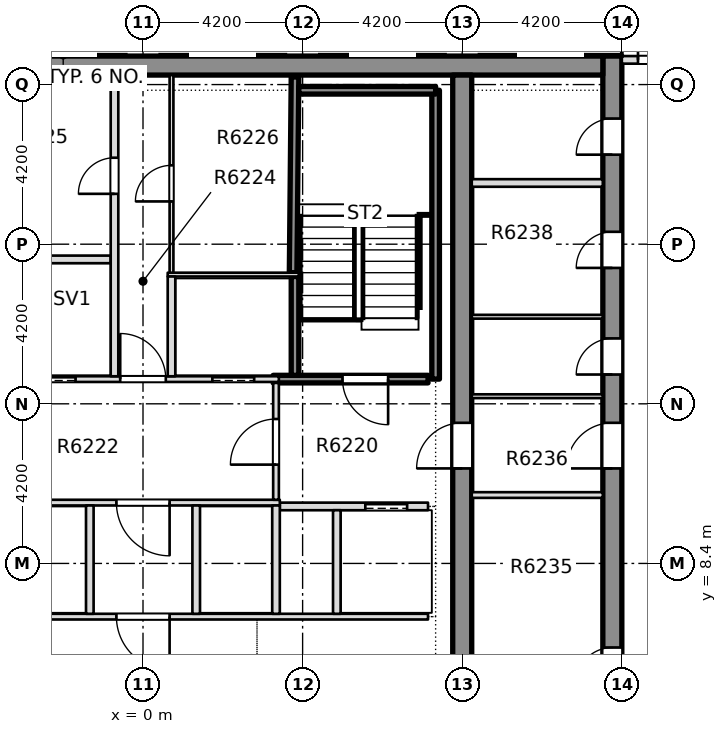
"""IFC4 building model, lengths in metres.
Left out: names, types, materials, properties, quantities, classifications, styles, units other than length and angle.
Written with IfcOpenShell. Run it as: python <this file> out.ifc"""

import sys

from ifc_helpers import new_model, si_unit, direction, frame, frame_2d, origin, place, context, subcontext, project, spatial, rectangle, extrude, element, fill, save


model = new_model("IFC4")
c1 = context("Model", 3, precision=1e-05, world=origin(), true_north=direction((0.0, 1.0)))
c2 = subcontext(c1, "Body", "Model", "MODEL_VIEW")
j1 = project(units=[si_unit("LENGTHUNIT", "METRE"), si_unit("PLANEANGLEUNIT", "RADIAN")], contexts=[c1])
p1 = place(None, origin())
s1 = spatial("IfcSite", under=j1, at=p1, CompositionType="ELEMENT")
p2 = place(p1, origin())
s2 = spatial("IfcBuilding", under=s1, at=p2, CompositionType="ELEMENT")
p3 = place(p2, frame((0.0, 0.0, 237.25)))
s3 = spatial("IfcBuildingStorey", under=s2, at=p3, CompositionType="ELEMENT", Elevation=237.25)
p4 = place(p3, frame((12.35, -8.4, -0.4), z_axis=(0.0, 0.0, 1.0), x_axis=(0.0, 1.0, 0.0)))
e1 = element("IfcWall", 1, at=p4, inside=s3, PredefinedType="SHEAR", context=c2, shape_type="SweptSolid", body=[
    extrude(rectangle(XDim=30.15, YDim=0.5, at=frame_2d((15.075, 0.0))), origin(), (0.0, 0.0, 1.0), 3.45),
])
p5 = place(p4, frame((4.788, 0.0, 0.4)))
e2 = element("IfcOpeningElement", 2, at=p5, cuts=e1, PredefinedType="OPENING", context=c2, shape_type="SweptSolid", body=[
    extrude(rectangle(XDim=0.95, YDim=2.1, at=frame_2d((0.475, 1.05))), frame((0.0, 0.26, 0.0), z_axis=(0.0, -1.0, 0.0), x_axis=(1.0, 0.0, 0.0)), (0.0, 0.0, 1.0), 0.52),
])
p6 = place(p4, frame((13.638, 0.0, 0.4)))
e3 = element("IfcOpeningElement", 3, at=p6, cuts=e1, PredefinedType="OPENING", context=c2, shape_type="SweptSolid", body=[
    extrude(rectangle(XDim=0.95, YDim=2.1, at=frame_2d((0.475, 1.05))), frame((0.0, 0.26, 0.0), z_axis=(0.0, -1.0, 0.0), x_axis=(1.0, 0.0, 0.0)), (0.0, 0.0, 1.0), 0.52),
])
p7 = place(p4, frame((21.771, 0.0, 0.4)))
e4 = element("IfcOpeningElement", 4, at=p7, cuts=e1, PredefinedType="OPENING", context=c2, shape_type="SweptSolid", body=[
    extrude(rectangle(XDim=0.95, YDim=2.1, at=frame_2d((0.475, 1.05))), frame((0.0, 0.26, 0.0), z_axis=(0.0, -1.0, 0.0), x_axis=(1.0, 0.0, 0.0)), (0.0, 0.0, 1.0), 0.52),
])
p8 = place(p4, frame((24.576, 0.0, 0.4)))
e5 = element("IfcOpeningElement", 5, at=p8, cuts=e1, PredefinedType="OPENING", context=c2, shape_type="SweptSolid", body=[
    extrude(rectangle(XDim=0.95, YDim=2.1, at=frame_2d((0.475, 1.05))), frame((0.0, 0.26, 0.0), z_axis=(0.0, -1.0, 0.0), x_axis=(1.0, 0.0, 0.0)), (0.0, 0.0, 1.0), 0.52),
])
p9 = place(p4, frame((27.555, 0.0, 0.4)))
e6 = element("IfcOpeningElement", 6, at=p9, cuts=e1, PredefinedType="OPENING", context=c2, shape_type="SweptSolid", body=[
    extrude(rectangle(XDim=0.95, YDim=2.1, at=frame_2d((0.475, 1.05))), frame((0.0, 0.26, 0.0), z_axis=(0.0, -1.0, 0.0), x_axis=(1.0, 0.0, 0.0)), (0.0, 0.0, 1.0), 0.52),
])
p10 = place(p4, frame((19.3, 0.0, 0.4)))
e7 = element("IfcOpeningElement", 7, at=p10, cuts=e1, PredefinedType="OPENING", context=c2, shape_type="SweptSolid", body=[
    extrude(rectangle(XDim=1.2, YDim=2.1, at=frame_2d((0.6, 1.05))), frame((0.0, 0.26, 0.0), z_axis=(0.0, -1.0, 0.0), x_axis=(1.0, 0.0, 0.0)), (0.0, 0.0, 1.0), 0.52),
])
p11 = place(p3, frame((-12.1, 21.5, -0.4), z_axis=(0.0, 0.0, 1.0), x_axis=(1.0, 0.0, 0.0)))
e8 = element("IfcWall", 8, at=p11, inside=s3, PredefinedType="SHEAR", context=c2, shape_type="SweptSolid", body=[
    extrude(rectangle(XDim=24.2, YDim=0.5, at=frame_2d((12.1, 0.0))), origin(), (0.0, 0.0, 1.0), 3.45),
])
p12 = place(p3, frame((8.4, -7.9, -0.4), z_axis=(0.0, 0.0, 1.0), x_axis=(0.0, 1.0, 0.0)))
e9 = element("IfcWall", 9, at=p12, inside=s3, PredefinedType="SHEAR", context=c2, shape_type="SweptSolid", body=[
    extrude(rectangle(XDim=29.15, YDim=0.5, at=frame_2d((14.575, 0.0))), origin(), (0.0, 0.0, 1.0), 3.45),
])
p13 = place(p12, frame((18.8, 0.0, 0.4)))
e10 = element("IfcOpeningElement", 10, at=p13, cuts=e9, PredefinedType="OPENING", context=c2, shape_type="SweptSolid", body=[
    extrude(rectangle(XDim=1.2, YDim=2.1, at=frame_2d((0.6, 1.05))), frame((0.0, 0.26, 0.0), z_axis=(0.0, -1.0, 0.0), x_axis=(1.0, 0.0, 0.0)), (0.0, 0.0, 1.0), 0.52),
])
p14 = place(p3, frame((16.35, 21.65, 0.0), z_axis=(0.0, 0.0, 1.0), x_axis=(-1.0, 0.0, 0.0)))
e11 = element("IfcWall", 11, at=p14, inside=s3, PredefinedType="STANDARD", context=c2, shape_type="SweptSolid", body=[
    extrude(rectangle(XDim=3.75, YDim=0.2, at=frame_2d((1.875, 0.0))), origin(), (0.0, 0.0, 1.0), 3.05),
])
p15 = place(p14, frame((2.325, 0.0, 0.0)))
e12 = element("IfcOpeningElement", 12, at=p15, cuts=e11, PredefinedType="OPENING", context=c2, shape_type="SweptSolid", body=[
    extrude(rectangle(XDim=1.0, YDim=2.4, at=frame_2d((0.5, 1.2))), frame((0.0, 0.11, 0.0), z_axis=(0.0, -1.0, 0.0), x_axis=(1.0, 0.0, 0.0)), (0.0, 0.0, 1.0), 0.22),
])
p16 = place(p3, frame((-7.5, 7.0, 0.0), z_axis=(0.0, 0.0, 1.0), x_axis=(1.0, 0.0, 0.0)))
e13 = element("IfcWall", 13, at=p16, inside=s3, PredefinedType="PARTITIONING", context=c2, shape_type="SweptSolid", body=[
    extrude(rectangle(XDim=15.0, YDim=0.15, at=frame_2d((7.5, 0.0))), origin(), (0.0, 0.0, 1.0), 3.05),
])
p17 = place(p16, frame((6.8, 0.0, 0.0)))
e14 = element("IfcOpeningElement", 14, at=p17, cuts=e13, PredefinedType="OPENING", context=c2, shape_type="SweptSolid", body=[
    extrude(rectangle(XDim=1.4, YDim=2.1, at=frame_2d((0.7, 1.05))), frame((0.0, 0.085, 0.0), z_axis=(0.0, -1.0, 0.0), x_axis=(1.0, 0.0, 0.0)), (0.0, 0.0, 1.0), 0.17),
])
p18 = place(p3, frame((3.6, 9.9, 0.0), z_axis=(0.0, 0.0, 1.0), x_axis=(1.0, 0.0, 0.0)))
e15 = element("IfcWall", 15, at=p18, inside=s3, PredefinedType="PARTITIONING", context=c2, shape_type="SweptSolid", body=[
    extrude(rectangle(XDim=3.9, YDim=0.2, at=frame_2d((1.95, 0.0))), origin(), (0.0, 0.0, 1.0), 3.05),
])
p19 = place(p18, frame((2.25, 0.0, 0.0)))
e16 = element("IfcOpeningElement", 16, at=p19, cuts=e15, PredefinedType="OPENING", context=c2, shape_type="SweptSolid", body=[
    extrude(rectangle(XDim=1.1, YDim=2.1, at=frame_2d((0.55, 1.05))), frame((0.0, 0.11, 0.0), z_axis=(0.0, -1.0, 0.0), x_axis=(1.0, 0.0, 0.0)), (0.0, 0.0, 1.0), 0.22),
])
p20 = place(p3, frame((-3.6, 10.0, 0.0), z_axis=(0.0, 0.0, 1.0), x_axis=(1.0, 0.0, 0.0)))
e17 = element("IfcWall", 17, at=p20, inside=s3, PredefinedType="PARTITIONING", context=c2, shape_type="SweptSolid", body=[
    extrude(rectangle(XDim=7.2, YDim=0.15, at=frame_2d((3.6, 0.0))), origin(), (0.0, 0.0, 1.0), 3.05),
])
p21 = place(p20, frame((2.9, 0.0, 0.0)))
e18 = element("IfcOpeningElement", 18, at=p21, cuts=e17, PredefinedType="OPENING", context=c2, shape_type="SweptSolid", body=[
    extrude(rectangle(XDim=1.4, YDim=2.1, at=frame_2d((0.7, 1.05))), frame((0.0, 0.085, 0.0), z_axis=(0.0, -1.0, 0.0), x_axis=(1.0, 0.0, 0.0)), (0.0, 0.0, 1.0), 0.17),
])
p22 = place(p3, frame((-3.575, 13.25, 0.0), z_axis=(0.0, 0.0, 1.0), x_axis=(1.0, 0.0, 0.0)))
e19 = element("IfcWall", 19, at=p22, inside=s3, PredefinedType="PARTITIONING", context=c2, shape_type="SweptSolid", body=[
    extrude(rectangle(XDim=7.15, YDim=0.15, at=frame_2d((3.575, 0.0))), origin(), (0.0, 0.0, 1.0), 3.05),
])
p23 = place(p22, frame((0.6, 0.0, 0.0)))
e20 = element("IfcOpeningElement", 20, at=p23, cuts=e19, PredefinedType="OPENING", context=c2, shape_type="SweptSolid", body=[
    extrude(rectangle(XDim=1.2, YDim=2.1, at=frame_2d((0.6, 1.05))), frame((0.0, 0.085, 0.0), z_axis=(0.0, -1.0, 0.0), x_axis=(1.0, 0.0, 0.0)), (0.0, 0.0, 1.0), 0.17),
])
p24 = place(p22, frame((5.4, 0.0, 0.0)))
e21 = element("IfcOpeningElement", 21, at=p24, cuts=e19, PredefinedType="OPENING", context=c2, shape_type="SweptSolid", body=[
    extrude(rectangle(XDim=1.1, YDim=2.1, at=frame_2d((0.55, 1.05))), frame((0.0, 0.085, 0.0), z_axis=(0.0, -1.0, 0.0), x_axis=(1.0, 0.0, 0.0)), (0.0, 0.0, 1.0), 0.17),
])
p25 = place(p22, frame((2.975, 0.0, 0.0)))
e22 = element("IfcOpeningElement", 22, at=p25, cuts=e19, PredefinedType="OPENING", context=c2, shape_type="SweptSolid", body=[
    extrude(rectangle(XDim=1.2, YDim=2.1, at=frame_2d((0.6, 1.05))), frame((0.0, 0.085, 0.0), z_axis=(0.0, -1.0, 0.0), x_axis=(1.0, 0.0, 0.0)), (0.0, 0.0, 1.0), 0.17),
])
p26 = place(p3, frame((3.425, 13.25, 0.0), z_axis=(0.0, 0.0, 1.0), x_axis=(1.0, 0.0, 0.0)))
e23 = element("IfcWall", 23, at=p26, inside=s3, PredefinedType="SOLIDWALL", context=c2, shape_type="SweptSolid", body=[
    extrude(rectangle(XDim=4.075, YDim=0.2, at=frame_2d((2.038, 0.0))), origin(), (0.0, 0.0, 1.0), 3.05),
])
p27 = place(p26, frame((1.825, 0.0, 0.0)))
e24 = element("IfcOpeningElement", 24, at=p27, cuts=e23, PredefinedType="OPENING", context=c2, shape_type="SweptSolid", body=[
    extrude(rectangle(XDim=1.2, YDim=2.1, at=frame_2d((0.6, 1.05))), frame((0.0, 0.11, 0.0), z_axis=(0.0, -1.0, 0.0), x_axis=(1.0, 0.0, 0.0)), (0.0, 0.0, 1.0), 0.22),
])
p28 = place(p3, frame((0.65, 16.0, 0.0), z_axis=(0.0, 0.0, 1.0), x_axis=(1.0, 0.0, 0.0)))
e25 = element("IfcWall", 25, at=p28, inside=s3, PredefinedType="PARTITIONING", context=c2, shape_type="SweptSolid", body=[
    extrude(rectangle(XDim=3.45, YDim=0.1, at=frame_2d((1.725, 0.0))), origin(), (0.0, 0.0, 1.0), 3.05),
])
p29 = place(p3, frame((-3.9, 16.4, 0.0), z_axis=(0.0, 0.0, 1.0), x_axis=(1.0, 0.0, 0.0)))
e26 = element("IfcWall", 26, at=p29, inside=s3, PredefinedType="PARTITIONING", context=c2, shape_type="SweptSolid", body=[
    extrude(rectangle(XDim=3.05, YDim=0.2, at=frame_2d((1.525, 0.0))), origin(), (0.0, 0.0, 1.0), 3.05),
])
p30 = place(p3, frame((-1.4, 7.075, 0.0), z_axis=(0.0, 0.0, 1.0), x_axis=(0.0, 1.0, 0.0)))
e27 = element("IfcWall", 27, at=p30, inside=s3, PredefinedType="PARTITIONING", context=c2, shape_type="SweptSolid", body=[
    extrude(rectangle(XDim=2.85, YDim=0.2, at=frame_2d((1.425, 0.0))), origin(), (0.0, 0.0, 1.0), 3.05),
])
p31 = place(p3, frame((-0.75, 13.325, 0.0), z_axis=(0.0, 0.0, 1.0), x_axis=(0.0, 1.0, 0.0)))
e28 = element("IfcWall", 28, at=p31, inside=s3, PredefinedType="PARTITIONING", context=c2, shape_type="SweptSolid", body=[
    extrude(rectangle(XDim=7.924, YDim=0.2, at=frame_2d((3.962, 0.0))), origin(), (0.0, 0.0, 1.0), 3.05),
])
p32 = place(p31, frame((4.8, 0.0, 0.0)))
e29 = element("IfcOpeningElement", 29, at=p32, cuts=e28, PredefinedType="OPENING", context=c2, shape_type="SweptSolid", body=[
    extrude(rectangle(XDim=0.95, YDim=2.1, at=frame_2d((0.475, 1.05))), frame((0.0, 0.11, 0.0), z_axis=(0.0, -1.0, 0.0), x_axis=(1.0, 0.0, 0.0)), (0.0, 0.0, 1.0), 0.22),
])
p33 = place(p3, frame((0.75, 13.325, 0.0), z_axis=(0.0, 0.0, 1.0), x_axis=(0.0, 1.0, 0.0)))
e30 = element("IfcWall", 30, at=p33, inside=s3, PredefinedType="PARTITIONING", context=c2, shape_type="SweptSolid", body=[
    extrude(rectangle(XDim=2.625, YDim=0.2, at=frame_2d((1.312, 0.0))), origin(), (0.0, 0.0, 1.0), 3.05),
])
p34 = place(p3, frame((0.75, 16.05, 0.0), z_axis=(0.0, 0.0, 1.0), x_axis=(0.0, 1.0, 0.0)))
e31 = element("IfcWall", 31, at=p34, inside=s3, PredefinedType="PARTITIONING", context=c2, shape_type="SweptSolid", body=[
    extrude(rectangle(XDim=5.199, YDim=0.1, at=frame_2d((2.6, 0.0))), origin(), (0.0, 0.0, 1.0), 3.05),
])
p35 = place(p34, frame((1.875, 0.0, 0.0)))
e32 = element("IfcOpeningElement", 32, at=p35, cuts=e31, PredefinedType="OPENING", context=c2, shape_type="SweptSolid", body=[
    extrude(rectangle(XDim=0.95, YDim=2.1, at=frame_2d((0.475, 1.05))), frame((0.0, 0.06, 0.0), z_axis=(0.0, -1.0, 0.0), x_axis=(1.0, 0.0, 0.0)), (0.0, 0.0, 1.0), 0.12),
])
for number, where, z_axis, x_axis in (
    (33, (1.4, 7.075, 0.0), (0.0, 0.0, 1.0), (0.0, 1.0, 0.0)),
    (34, (3.5, 7.075, 0.0), (0.0, 0.0, 1.0), (0.0, 1.0, 0.0)),
):
    element("IfcWall", number, at=place(p3, frame(where, z_axis=z_axis, x_axis=x_axis)), inside=s3, PredefinedType="PARTITIONING", context=c2, shape_type="SweptSolid", body=[
        extrude(rectangle(XDim=2.85, YDim=0.2, at=frame_2d((1.425, 0.0))), origin(), (0.0, 0.0, 1.0), 3.05),
    ])
p36 = place(p3, frame((3.5, 10.075, 0.0), z_axis=(0.0, 0.0, 1.0), x_axis=(0.0, 1.0, 0.0)))
e35 = element("IfcWall", 35, at=p36, inside=s3, PredefinedType="PARTITIONING", context=c2, shape_type="SweptSolid", body=[
    extrude(rectangle(XDim=3.075, YDim=0.15, at=frame_2d((1.538, 0.0))), origin(), (0.0, 0.0, 1.0), 3.05),
])
p37 = place(p36, frame((0.925, 0.0, 0.0)))
e36 = element("IfcOpeningElement", 36, at=p37, cuts=e35, PredefinedType="OPENING", context=c2, shape_type="SweptSolid", body=[
    extrude(rectangle(XDim=1.2, YDim=2.1, at=frame_2d((0.6, 1.05))), frame((0.0, 0.085, 0.0), z_axis=(0.0, -1.0, 0.0), x_axis=(1.0, 0.0, 0.0)), (0.0, 0.0, 1.0), 0.17),
])
p38 = place(p3, frame((4.0, 13.35, 0.0), z_axis=(0.0, 0.0, 1.0), x_axis=(0.0, 1.0, 0.0)))
e37 = element("IfcWall", 37, at=p38, inside=s3, PredefinedType="SOLIDWALL", context=c2, shape_type="SweptSolid", body=[
    extrude(rectangle(XDim=2.6, YDim=0.2, at=frame_2d((1.3, 0.0))), origin(), (0.0, 0.0, 1.0), 3.05),
])
p39 = place(p3, frame((3.95, 16.05, 0.0), z_axis=(0.0, 0.0, 1.0), x_axis=(0.009719787395, 0.999952761751, 0.0)))
e38 = element("IfcWall", 38, at=p39, inside=s3, PredefinedType="SOLIDWALL", context=c2, shape_type="SweptSolid", body=[
    extrude(rectangle(XDim=5.149, YDim=0.2, at=frame_2d((2.575, 0.0))), origin(), (0.0, 0.0, 1.0), 3.05),
])
p40 = place(p3, frame((5.1, 7.075, 0.0), z_axis=(0.0, 0.0, 1.0), x_axis=(0.0, 1.0, 0.0)))
e39 = element("IfcWall", 39, at=p40, inside=s3, PredefinedType="PARTITIONING", context=c2, shape_type="SweptSolid", body=[
    extrude(rectangle(XDim=2.725, YDim=0.2, at=frame_2d((1.363, 0.0))), origin(), (0.0, 0.0, 1.0), 3.05),
])
p41 = place(p3, frame((8.651, 10.2, 0.0), z_axis=(0.0, 0.0, 1.0), x_axis=(1.0, 0.0, 0.0)))
e40 = element("IfcWall", 40, at=p41, inside=s3, PredefinedType="PARTITIONING", context=c2, shape_type="SweptSolid", body=[
    extrude(rectangle(XDim=3.448, YDim=0.15, at=frame_2d((1.724, 0.0))), origin(), (0.0, 0.0, 1.0), 3.05),
])
for number, where, z_axis, x_axis in (
    (41, (8.651, 12.8, 0.0), (0.0, 0.0, 1.0), (1.0, 0.0, 0.0)),
    (42, (8.651, 14.891, 0.0), (0.0, 0.0, 1.0), (1.0, 0.0, 0.0)),
):
    element("IfcWall", number, at=place(p3, frame(where, z_axis=z_axis, x_axis=x_axis)), inside=s3, PredefinedType="PARTITIONING", context=c2, shape_type="SweptSolid", body=[
        extrude(rectangle(XDim=3.448, YDim=0.1, at=frame_2d((1.724, 0.0))), origin(), (0.0, 0.0, 1.0), 3.05),
    ])
p42 = place(p3, frame((8.651, 18.411, 0.0), z_axis=(0.0, 0.0, 1.0), x_axis=(1.0, 0.0, 0.0)))
e43 = element("IfcWall", 43, at=p42, inside=s3, PredefinedType="PARTITIONING", context=c2, shape_type="SweptSolid", body=[
    extrude(rectangle(XDim=3.448, YDim=0.2, at=frame_2d((1.724, 0.0))), origin(), (0.0, 0.0, 1.0), 3.05),
])
p43 = place(p3, frame((7.7, 13.25, 0.0), z_axis=(0.0, 0.0, 1.0), x_axis=(0.0, 1.0, 0.0)))
e44 = element("IfcWall", 44, at=p43, inside=s3, PredefinedType="SOLIDWALL", context=c2, shape_type="SweptSolid", body=[
    extrude(rectangle(XDim=7.6, YDim=0.2, at=frame_2d((3.8, 0.0))), origin(), (0.0, 0.0, 1.0), 3.05),
])
p44 = place(p3, frame((4.1, 20.85, 0.0), z_axis=(0.0, 0.0, 1.0), x_axis=(1.0, 0.0, 0.0)))
e45 = element("IfcWall", 45, at=p44, inside=s3, PredefinedType="SOLIDWALL", context=c2, shape_type="SweptSolid", body=[
    extrude(rectangle(XDim=3.6, YDim=0.2, at=frame_2d((1.8, 0.0))), origin(), (0.0, 0.0, 1.0), 3.05),
])
p45 = place(p15, origin())
e46 = element("IfcDoor", 46, at=p45, inside=s3, OperationType="SINGLE_SWING_LEFT", PredefinedType="DOOR", context=c2, shape_type="SweptSolid", body=[
    extrude(rectangle(XDim=1.0, YDim=2.4, at=frame_2d((0.5, 1.2))), frame((0.0, 0.025, 0.0), z_axis=(0.0, -1.0, 0.0), x_axis=(1.0, 0.0, 0.0)), (0.0, 0.0, 1.0), 0.05),
])
fill(e12, e46)
p46 = place(p27, origin())
e47 = element("IfcDoor", 47, at=p46, inside=s3, OperationType="SINGLE_SWING_RIGHT", PredefinedType="DOOR", context=c2, shape_type="SweptSolid", body=[
    extrude(rectangle(XDim=1.2, YDim=2.1, at=frame_2d((0.6, 1.05))), frame((0.0, 0.025, 0.0), z_axis=(0.0, -1.0, 0.0), x_axis=(1.0, 0.0, 0.0)), (0.0, 0.0, 1.0), 0.05),
])
fill(e24, e47)
p47 = place(p19, origin())
e48 = element("IfcDoor", 48, at=p47, inside=s3, OperationType="SLIDING_TO_LEFT", PredefinedType="DOOR", context=c2, shape_type="SweptSolid", body=[
    extrude(rectangle(XDim=1.1, YDim=2.1, at=frame_2d((0.55, 1.05))), frame((0.0, 0.025, 0.0), z_axis=(0.0, -1.0, 0.0), x_axis=(1.0, 0.0, 0.0)), (0.0, 0.0, 1.0), 0.05),
])
fill(e16, e48)
p48 = place(p17, origin())
e49 = element("IfcDoor", 49, at=p48, inside=s3, OperationType="SINGLE_SWING_RIGHT", PredefinedType="DOOR", context=c2, shape_type="SweptSolid", body=[
    extrude(rectangle(XDim=1.4, YDim=2.1, at=frame_2d((0.7, 1.05))), frame((0.0, 0.025, 0.0), z_axis=(0.0, -1.0, 0.0), x_axis=(1.0, 0.0, 0.0)), (0.0, 0.0, 1.0), 0.05),
])
fill(e14, e49)
p49 = place(p21, origin())
e50 = element("IfcDoor", 50, at=p49, inside=s3, OperationType="SINGLE_SWING_RIGHT", PredefinedType="DOOR", context=c2, shape_type="SweptSolid", body=[
    extrude(rectangle(XDim=1.4, YDim=2.1, at=frame_2d((0.7, 1.05))), frame((0.0, 0.025, 0.0), z_axis=(0.0, -1.0, 0.0), x_axis=(1.0, 0.0, 0.0)), (0.0, 0.0, 1.0), 0.05),
])
fill(e18, e50)
p50 = place(p23, origin())
e51 = element("IfcDoor", 51, at=p50, inside=s3, OperationType="SLIDING_TO_RIGHT", PredefinedType="DOOR", context=c2, shape_type="SweptSolid", body=[
    extrude(rectangle(XDim=1.2, YDim=2.1, at=frame_2d((0.6, 1.05))), frame((0.0, 0.025, 0.0), z_axis=(0.0, -1.0, 0.0), x_axis=(1.0, 0.0, 0.0)), (0.0, 0.0, 1.0), 0.05),
])
fill(e20, e51)
p51 = place(p24, origin())
e52 = element("IfcDoor", 52, at=p51, inside=s3, OperationType="SLIDING_TO_LEFT", PredefinedType="DOOR", context=c2, shape_type="SweptSolid", body=[
    extrude(rectangle(XDim=1.1, YDim=2.1, at=frame_2d((0.55, 1.05))), frame((0.0, 0.025, 0.0), z_axis=(0.0, -1.0, 0.0), x_axis=(1.0, 0.0, 0.0)), (0.0, 0.0, 1.0), 0.05),
])
fill(e21, e52)
p52 = place(p25, origin())
e53 = element("IfcDoor", 53, at=p52, inside=s3, OperationType="SINGLE_SWING_RIGHT", PredefinedType="DOOR", context=c2, shape_type="SweptSolid", body=[
    extrude(rectangle(XDim=1.2, YDim=2.1, at=frame_2d((0.6, 1.05))), frame((0.0, 0.025, 0.0), z_axis=(0.0, -1.0, 0.0), x_axis=(1.0, 0.0, 0.0)), (0.0, 0.0, 1.0), 0.05),
])
fill(e22, e53)
p53 = place(p32, origin())
e54 = element("IfcDoor", 54, at=p53, inside=s3, OperationType="SINGLE_SWING_RIGHT", PredefinedType="DOOR", context=c2, shape_type="SweptSolid", body=[
    extrude(rectangle(XDim=0.95, YDim=2.1, at=frame_2d((0.475, 1.05))), frame((0.0, 0.025, 0.0), z_axis=(0.0, -1.0, 0.0), x_axis=(1.0, 0.0, 0.0)), (0.0, 0.0, 1.0), 0.05),
])
fill(e29, e54)
p54 = place(p35, origin())
e55 = element("IfcDoor", 55, at=p54, inside=s3, OperationType="SINGLE_SWING_LEFT", PredefinedType="DOOR", context=c2, shape_type="SweptSolid", body=[
    extrude(rectangle(XDim=0.95, YDim=2.1, at=frame_2d((0.475, 1.05))), frame((0.0, 0.025, 0.0), z_axis=(0.0, -1.0, 0.0), x_axis=(1.0, 0.0, 0.0)), (0.0, 0.0, 1.0), 0.05),
])
fill(e32, e55)
p55 = place(p37, origin())
e56 = element("IfcDoor", 56, at=p55, inside=s3, OperationType="SINGLE_SWING_LEFT", PredefinedType="DOOR", context=c2, shape_type="SweptSolid", body=[
    extrude(rectangle(XDim=1.2, YDim=2.1, at=frame_2d((0.6, 1.05))), frame((0.0, 0.025, 0.0), z_axis=(0.0, -1.0, 0.0), x_axis=(1.0, 0.0, 0.0)), (0.0, 0.0, 1.0), 0.05),
])
fill(e36, e56)
p56 = place(p6, origin())
e57 = element("IfcDoor", 57, at=p56, inside=s3, OperationType="SINGLE_SWING_LEFT", PredefinedType="DOOR", context=c2, shape_type="SweptSolid", body=[
    extrude(rectangle(XDim=0.95, YDim=2.1, at=frame_2d((0.475, 1.05))), frame((0.0, 0.025, 0.0), z_axis=(0.0, -1.0, 0.0), x_axis=(1.0, 0.0, 0.0)), (0.0, 0.0, 1.0), 0.05),
])
fill(e3, e57)
p57 = place(p7, origin())
e58 = element("IfcDoor", 58, at=p57, inside=s3, OperationType="SINGLE_SWING_LEFT", PredefinedType="DOOR", context=c2, shape_type="SweptSolid", body=[
    extrude(rectangle(XDim=0.95, YDim=2.1, at=frame_2d((0.475, 1.05))), frame((0.0, 0.025, 0.0), z_axis=(0.0, -1.0, 0.0), x_axis=(1.0, 0.0, 0.0)), (0.0, 0.0, 1.0), 0.05),
])
fill(e4, e58)
p58 = place(p8, origin())
e59 = element("IfcDoor", 59, at=p58, inside=s3, OperationType="SINGLE_SWING_LEFT", PredefinedType="DOOR", context=c2, shape_type="SweptSolid", body=[
    extrude(rectangle(XDim=0.95, YDim=2.1, at=frame_2d((0.475, 1.05))), frame((0.0, 0.025, 0.0), z_axis=(0.0, -1.0, 0.0), x_axis=(1.0, 0.0, 0.0)), (0.0, 0.0, 1.0), 0.05),
])
fill(e5, e59)
p59 = place(p9, origin())
e60 = element("IfcDoor", 60, at=p59, inside=s3, OperationType="SINGLE_SWING_LEFT", PredefinedType="DOOR", context=c2, shape_type="SweptSolid", body=[
    extrude(rectangle(XDim=0.95, YDim=2.1, at=frame_2d((0.475, 1.05))), frame((0.0, 0.025, 0.0), z_axis=(0.0, -1.0, 0.0), x_axis=(1.0, 0.0, 0.0)), (0.0, 0.0, 1.0), 0.05),
])
fill(e6, e60)
p60 = place(p10, origin())
e61 = element("IfcDoor", 61, at=p60, inside=s3, OperationType="SINGLE_SWING_LEFT", PredefinedType="DOOR", context=c2, shape_type="SweptSolid", body=[
    extrude(rectangle(XDim=1.2, YDim=2.1, at=frame_2d((0.6, 1.05))), frame((0.0, 0.025, 0.0), z_axis=(0.0, -1.0, 0.0), x_axis=(1.0, 0.0, 0.0)), (0.0, 0.0, 1.0), 0.05),
])
fill(e7, e61)
p61 = place(p13, origin())
e62 = element("IfcDoor", 62, at=p61, inside=s3, OperationType="SINGLE_SWING_LEFT", PredefinedType="DOOR", context=c2, shape_type="SweptSolid", body=[
    extrude(rectangle(XDim=1.2, YDim=2.1, at=frame_2d((0.6, 1.05))), frame((0.0, 0.025, 0.0), z_axis=(0.0, -1.0, 0.0), x_axis=(1.0, 0.0, 0.0)), (0.0, 0.0, 1.0), 0.05),
])
fill(e10, e62)
save(model, sys.argv[1])
